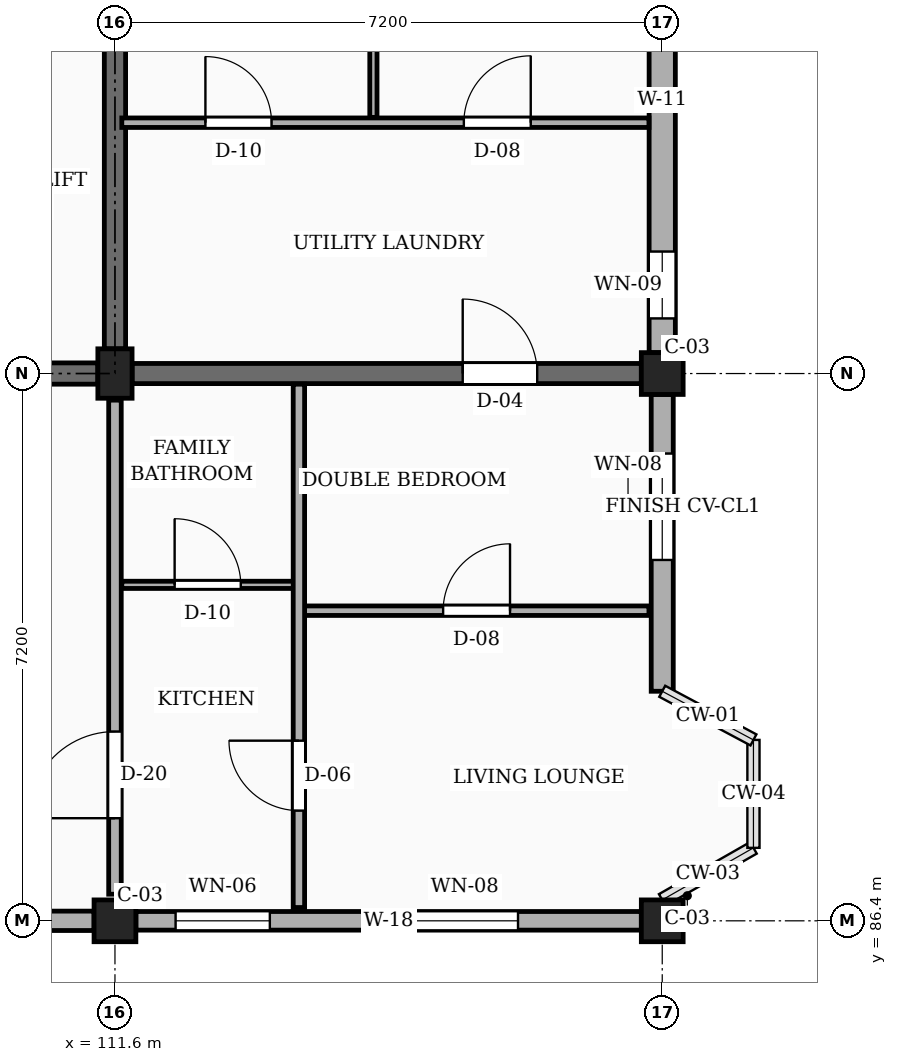
"""IFC4 building model, lengths in metres.
Left out: names, types, materials, properties, quantities, classifications, styles, units other than length and angle.
Written with IfcOpenShell. Run it as: python <this file> out.ifc"""

import sys

from ifc_helpers import new_model, si_unit, direction, frame, frame_2d, origin, origin_2d, place, context, subcontext, project, spatial, rectangle, extrude, element, fill, save


model = new_model("IFC4")
c1 = context("Model", 3, precision=1e-05, world=origin(), true_north=direction((0.0, 1.0)))
c2 = subcontext(c1, "Body", "Model", "MODEL_VIEW")
j1 = project(units=[si_unit("LENGTHUNIT", "METRE"), si_unit("PLANEANGLEUNIT", "RADIAN")], contexts=[c1])
p1 = place(None, origin())
s1 = spatial("IfcSite", under=j1, at=p1, CompositionType="ELEMENT")
p2 = place(p1, origin())
s2 = spatial("IfcBuilding", under=s1, at=p2, CompositionType="ELEMENT")
p3 = place(p2, frame((0.0, 0.0, 10.8)))
s3 = spatial("IfcBuildingStorey", under=s2, at=p3, CompositionType="ELEMENT", Elevation=10.8)
p4 = place(p3, frame((111.6, 86.4, 0.0), z_axis=(0.0, 0.0, 1.0), x_axis=(1.0, 0.0, 0.0)))
e1 = element("IfcColumn", 1, at=p4, inside=s3, PredefinedType="COLUMN", context=c2, shape_type="SweptSolid", body=[
    extrude(rectangle(XDim=0.55, YDim=0.55, at=origin_2d()), origin(), (0.0, 0.0, 1.0), 3.15),
])
p5 = place(p3, frame((111.6, 93.6, 0.0), z_axis=(0.0, 0.0, 1.0), x_axis=(1.0, 0.0, 0.0)))
e2 = element("IfcColumn", 2, at=p5, inside=s3, PredefinedType="COLUMN", context=c2, shape_type="SweptSolid", body=[
    extrude(rectangle(XDim=0.45, YDim=0.65, at=origin_2d()), origin(), (0.0, 0.0, 1.0), 3.15),
])
for number, where, z_axis, x_axis in (
    (3, (118.8, 86.4, 0.0), (0.0, 0.0, 1.0), (1.0, 0.0, 0.0)),
    (4, (118.8, 93.6, 0.0), (0.0, 0.0, 1.0), (1.0, 0.0, 0.0)),
):
    element("IfcColumn", number, at=place(p3, frame(where, z_axis=z_axis, x_axis=x_axis)), inside=s3, PredefinedType="COLUMN", context=c2, shape_type="SweptSolid", body=[
        extrude(rectangle(XDim=0.55, YDim=0.55, at=origin_2d()), origin(), (0.0, 0.0, 1.0), 3.15),
    ])
p6 = place(p3, frame((111.825, 93.6, 0.0), z_axis=(0.0, 0.0, 1.0), x_axis=(1.0, 0.0, 0.0)))
e5 = element("IfcWall", 5, at=p6, inside=s3, PredefinedType="SOLIDWALL", context=c2, shape_type="SweptSolid", body=[
    extrude(rectangle(XDim=6.7, YDim=0.265, at=frame_2d((3.35, 0.0))), origin(), (0.0, 0.0, 1.0), 2.19),
])
p7 = place(p6, frame((4.35, 0.0, 0.0)))
e6 = element("IfcOpeningElement", 6, at=p7, cuts=e5, PredefinedType="OPENING", context=c2, shape_type="SweptSolid", body=[
    extrude(rectangle(XDim=0.98, YDim=2.12, at=frame_2d((0.49, 1.06))), frame((0.0, 0.143, 0.0), z_axis=(0.0, -1.0, 0.0), x_axis=(1.0, 0.0, 0.0)), (0.0, 0.0, 1.0), 0.285),
])
p8 = place(p3, frame((104.675, 86.4, 0.0), z_axis=(0.0, 0.0, 1.0), x_axis=(1.0, 0.0, 0.0)))
e7 = element("IfcWall", 7, at=p8, inside=s3, PredefinedType="SOLIDWALL", context=c2, shape_type="SweptSolid", body=[
    extrude(rectangle(XDim=6.65, YDim=0.255, at=frame_2d((3.325, 0.0))), origin(), (0.0, 0.0, 1.0), 2.46),
])
p9 = place(p8, frame((0.45, 0.0, 0.78)))
e8 = element("IfcOpeningElement", 8, at=p9, cuts=e7, PredefinedType="OPENING", context=c2, shape_type="SweptSolid", body=[
    extrude(rectangle(XDim=1.08, YDim=1.15, at=frame_2d((0.54, 0.575))), frame((0.0, 0.137, 0.0), z_axis=(0.0, -1.0, 0.0), x_axis=(1.0, 0.0, 0.0)), (0.0, 0.0, 1.0), 0.275),
])
p10 = place(p8, frame((4.65, 0.0, 0.78)))
e9 = element("IfcOpeningElement", 9, at=p10, cuts=e7, PredefinedType="OPENING", context=c2, shape_type="SweptSolid", body=[
    extrude(rectangle(XDim=1.24, YDim=1.15, at=frame_2d((0.62, 0.575))), frame((0.0, 0.137, 0.0), z_axis=(0.0, -1.0, 0.0), x_axis=(1.0, 0.0, 0.0)), (0.0, 0.0, 1.0), 0.275),
])
p11 = place(p3, frame((111.875, 86.4, 0.0), z_axis=(0.0, 0.0, 1.0), x_axis=(1.0, 0.0, 0.0)))
e10 = element("IfcWall", 10, at=p11, inside=s3, PredefinedType="SOLIDWALL", context=c2, shape_type="SweptSolid", body=[
    extrude(rectangle(XDim=6.65, YDim=0.245, at=frame_2d((3.325, 0.0))), origin(), (0.0, 0.0, 1.0), 2.46),
])
p12 = place(p11, frame((0.522, 0.0, 0.78)))
e11 = element("IfcOpeningElement", 11, at=p12, cuts=e10, PredefinedType="OPENING", context=c2, shape_type="SweptSolid", body=[
    extrude(rectangle(XDim=1.24, YDim=1.15, at=frame_2d((0.62, 0.575))), frame((0.0, 0.133, 0.0), z_axis=(0.0, -1.0, 0.0), x_axis=(1.0, 0.0, 0.0)), (0.0, 0.0, 1.0), 0.265),
])
p13 = place(p11, frame((3.627, 0.0, 0.78)))
e12 = element("IfcOpeningElement", 12, at=p13, cuts=e10, PredefinedType="OPENING", context=c2, shape_type="SweptSolid", body=[
    extrude(rectangle(XDim=1.4, YDim=1.15, at=frame_2d((0.7, 0.575))), frame((0.0, 0.133, 0.0), z_axis=(0.0, -1.0, 0.0), x_axis=(1.0, 0.0, 0.0)), (0.0, 0.0, 1.0), 0.265),
])
p14 = place(p3, frame((118.8, 89.42, 0.0), z_axis=(0.0, 0.0, 1.0), x_axis=(0.0, 1.0, 0.0)))
e13 = element("IfcWall", 13, at=p14, inside=s3, PredefinedType="SOLIDWALL", context=c2, shape_type="SweptSolid", body=[
    extrude(rectangle(XDim=3.905, YDim=0.29, at=frame_2d((1.953, 0.0))), origin(), (0.0, 0.0, 1.0), 2.46),
])
p15 = place(p14, frame((1.728, 0.0, 0.78)))
e14 = element("IfcOpeningElement", 14, at=p15, cuts=e13, PredefinedType="OPENING", context=c2, shape_type="SweptSolid", body=[
    extrude(rectangle(XDim=1.4, YDim=1.15, at=frame_2d((0.7, 0.575))), frame((0.0, 0.155, 0.0), z_axis=(0.0, -1.0, 0.0), x_axis=(1.0, 0.0, 0.0)), (0.0, 0.0, 1.0), 0.31),
])
p16 = place(p3, frame((118.8, 93.875, 0.0), z_axis=(0.0, 0.0, 1.0), x_axis=(0.0, 1.0, 0.0)))
e15 = element("IfcWall", 15, at=p16, inside=s3, PredefinedType="SOLIDWALL", context=c2, shape_type="SweptSolid", body=[
    extrude(rectangle(XDim=6.65, YDim=0.345, at=frame_2d((3.325, 0.0))), origin(), (0.0, 0.0, 1.0), 2.46),
])
p17 = place(p16, frame((0.45, 0.0, 0.78)))
e16 = element("IfcOpeningElement", 16, at=p17, cuts=e15, PredefinedType="OPENING", context=c2, shape_type="SweptSolid", body=[
    extrude(rectangle(XDim=0.88, YDim=1.26, at=frame_2d((0.44, 0.63))), frame((0.0, 0.183, 0.0), z_axis=(0.0, -1.0, 0.0), x_axis=(1.0, 0.0, 0.0)), (0.0, 0.0, 1.0), 0.365),
])
p18 = place(p16, frame((4.65, 0.0, 0.78)))
e17 = element("IfcOpeningElement", 17, at=p18, cuts=e15, PredefinedType="OPENING", context=c2, shape_type="SweptSolid", body=[
    extrude(rectangle(XDim=1.04, YDim=1.26, at=frame_2d((0.52, 0.63))), frame((0.0, 0.183, 0.0), z_axis=(0.0, -1.0, 0.0), x_axis=(1.0, 0.0, 0.0)), (0.0, 0.0, 1.0), 0.365),
])
p19 = place(p3, frame((111.6, 93.925, 0.0), z_axis=(0.0, 0.0, 1.0), x_axis=(0.0, 1.0, 0.0)))
e18 = element("IfcWall", 18, at=p19, inside=s3, PredefinedType="SHEAR", context=c2, shape_type="SweptSolid", body=[
    extrude(rectangle(XDim=6.55, YDim=0.28, at=frame_2d((3.275, 0.0))), origin(), (0.0, 0.0, 1.0), 2.89),
])
p20 = place(p3, frame((104.625, 93.6, 0.0), z_axis=(0.0, 0.0, 1.0), x_axis=(1.0, 0.0, 0.0)))
e19 = element("IfcWall", 19, at=p20, inside=s3, PredefinedType="SHEAR", context=c2, shape_type="SweptSolid", body=[
    extrude(rectangle(XDim=6.75, YDim=0.28, at=frame_2d((3.375, 0.0))), origin(), (0.0, 0.0, 1.0), 2.89),
])
p21 = place(p20, frame((4.525, 0.0, 0.0)))
e20 = element("IfcOpeningElement", 20, at=p21, cuts=e19, PredefinedType="OPENING", context=c2, shape_type="SweptSolid", body=[
    extrude(rectangle(XDim=1.1, YDim=2.15, at=frame_2d((0.55, 1.075))), frame((0.0, 0.15, 0.0), z_axis=(0.0, -1.0, 0.0), x_axis=(1.0, 0.0, 0.0)), (0.0, 0.0, 1.0), 0.3),
])
p22 = place(p3, frame((111.6, 86.75, 0.0), z_axis=(0.0, 0.0, 1.0), x_axis=(0.0, 1.0, 0.0)))
e21 = element("IfcWall", 21, at=p22, inside=s3, PredefinedType="PARTITIONING", context=c2, shape_type="SweptSolid", body=[
    extrude(rectangle(XDim=6.5, YDim=0.165, at=frame_2d((3.25, 0.0))), origin(), (0.0, 0.0, 1.0), 2.24),
])
p23 = place(p22, frame((1.0, 0.0, 0.0)))
e22 = element("IfcOpeningElement", 22, at=p23, cuts=e21, PredefinedType="OPENING", context=c2, shape_type="SweptSolid", body=[
    extrude(rectangle(XDim=1.14, YDim=2.18, at=frame_2d((0.57, 1.09))), frame((0.0, 0.093, 0.0), z_axis=(0.0, -1.0, 0.0), x_axis=(1.0, 0.0, 0.0)), (0.0, 0.0, 1.0), 0.185),
])
p24 = place(p3, frame((114.09, 90.48, 0.0), z_axis=(0.0, 0.0, 1.0), x_axis=(1.0, 0.0, 0.0)))
e23 = element("IfcWall", 23, at=p24, inside=s3, PredefinedType="PARTITIONING", context=c2, shape_type="SweptSolid", body=[
    extrude(rectangle(XDim=4.535, YDim=0.125, at=frame_2d((2.268, 0.0))), origin(), (0.0, 0.0, 1.0), 2.325),
])
p25 = place(p24, frame((1.827, 0.0, 0.0)))
e24 = element("IfcOpeningElement", 24, at=p25, cuts=e23, PredefinedType="OPENING", context=c2, shape_type="SweptSolid", body=[
    extrude(rectangle(XDim=0.88, YDim=2.08, at=frame_2d((0.44, 1.04))), frame((0.0, 0.073, 0.0), z_axis=(0.0, -1.0, 0.0), x_axis=(1.0, 0.0, 0.0)), (0.0, 0.0, 1.0), 0.145),
])
p26 = place(p3, frame((111.69, 90.82, 0.0), z_axis=(0.0, 0.0, 1.0), x_axis=(1.0, 0.0, 0.0)))
e25 = element("IfcWall", 25, at=p26, inside=s3, PredefinedType="PARTITIONING", context=c2, shape_type="SweptSolid", body=[
    extrude(rectangle(XDim=2.26, YDim=0.095, at=frame_2d((1.13, 0.0))), origin(), (0.0, 0.0, 1.0), 2.325),
])
p27 = place(p26, frame((0.695, 0.0, 0.0)))
e26 = element("IfcOpeningElement", 26, at=p27, cuts=e25, PredefinedType="OPENING", context=c2, shape_type="SweptSolid", body=[
    extrude(rectangle(XDim=0.87, YDim=2.05, at=frame_2d((0.435, 1.025))), frame((0.0, 0.058, 0.0), z_axis=(0.0, -1.0, 0.0), x_axis=(1.0, 0.0, 0.0)), (0.0, 0.0, 1.0), 0.115),
])
p28 = place(p3, frame((114.02, 86.575, 0.0), z_axis=(0.0, 0.0, 1.0), x_axis=(0.0, 1.0, 0.0)))
e27 = element("IfcWall", 27, at=p28, inside=s3, PredefinedType="PARTITIONING", context=c2, shape_type="SweptSolid", body=[
    extrude(rectangle(XDim=6.885, YDim=0.15, at=frame_2d((3.442, 0.0))), origin(), (0.0, 0.0, 1.0), 2.325),
])
p29 = place(p28, frame((1.275, 0.0, 0.0)))
e28 = element("IfcOpeningElement", 28, at=p29, cuts=e27, PredefinedType="OPENING", context=c2, shape_type="SweptSolid", body=[
    extrude(rectangle(XDim=0.92, YDim=2.1, at=frame_2d((0.46, 1.05))), frame((0.0, 0.085, 0.0), z_axis=(0.0, -1.0, 0.0), x_axis=(1.0, 0.0, 0.0)), (0.0, 0.0, 1.0), 0.17),
])
p30 = place(p3, frame((111.69, 96.9, 0.0), z_axis=(0.0, 0.0, 1.0), x_axis=(1.0, 0.0, 0.0)))
e29 = element("IfcWall", 29, at=p30, inside=s3, PredefinedType="PARTITIONING", context=c2, shape_type="SweptSolid", body=[
    extrude(rectangle(XDim=6.935, YDim=0.125, at=frame_2d((3.468, 0.0))), origin(), (0.0, 0.0, 1.0), 2.325),
])
p31 = place(p30, frame((1.1, 0.0, 0.0)))
e30 = element("IfcOpeningElement", 30, at=p31, cuts=e29, PredefinedType="OPENING", context=c2, shape_type="SweptSolid", body=[
    extrude(rectangle(XDim=0.87, YDim=2.05, at=frame_2d((0.435, 1.025))), frame((0.0, 0.073, 0.0), z_axis=(0.0, -1.0, 0.0), x_axis=(1.0, 0.0, 0.0)), (0.0, 0.0, 1.0), 0.145),
])
p32 = place(p30, frame((4.5, 0.0, 0.0)))
e31 = element("IfcOpeningElement", 31, at=p32, cuts=e29, PredefinedType="OPENING", context=c2, shape_type="SweptSolid", body=[
    extrude(rectangle(XDim=0.88, YDim=2.08, at=frame_2d((0.44, 1.04))), frame((0.0, 0.073, 0.0), z_axis=(0.0, -1.0, 0.0), x_axis=(1.0, 0.0, 0.0)), (0.0, 0.0, 1.0), 0.145),
])
p33 = place(p3, frame((115.0, 96.97, 0.0), z_axis=(0.0, 0.0, 1.0), x_axis=(0.0, 1.0, 0.0)))
e32 = element("IfcWall", 32, at=p33, inside=s3, PredefinedType="PARTITIONING", context=c2, shape_type="SweptSolid", body=[
    extrude(rectangle(XDim=3.69, YDim=0.095, at=frame_2d((1.845, 0.0))), origin(), (0.0, 0.0, 1.0), 2.325),
])
p34 = place(p12, origin())
e33 = element("IfcWindow", 33, at=p34, inside=s3, PartitioningType="SINGLE_PANEL", PredefinedType="WINDOW", context=c2, shape_type="SweptSolid", body=[
    extrude(rectangle(XDim=1.24, YDim=1.15, at=frame_2d((0.62, 0.575))), frame((0.0, 0.03, 0.0), z_axis=(0.0, -1.0, 0.0), x_axis=(1.0, 0.0, 0.0)), (0.0, 0.0, 1.0), 0.06),
])
fill(e11, e33)
p35 = place(p13, origin())
e34 = element("IfcWindow", 34, at=p35, inside=s3, PartitioningType="SINGLE_PANEL", PredefinedType="WINDOW", context=c2, shape_type="SweptSolid", body=[
    extrude(rectangle(XDim=1.4, YDim=1.15, at=frame_2d((0.7, 0.575))), frame((0.0, 0.03, 0.0), z_axis=(0.0, -1.0, 0.0), x_axis=(1.0, 0.0, 0.0)), (0.0, 0.0, 1.0), 0.06),
])
fill(e12, e34)
p36 = place(p15, origin())
e35 = element("IfcWindow", 35, at=p36, inside=s3, PartitioningType="SINGLE_PANEL", PredefinedType="WINDOW", context=c2, shape_type="SweptSolid", body=[
    extrude(rectangle(XDim=1.4, YDim=1.15, at=frame_2d((0.7, 0.575))), frame((0.0, 0.03, 0.0), z_axis=(0.0, -1.0, 0.0), x_axis=(1.0, 0.0, 0.0)), (0.0, 0.0, 1.0), 0.06),
])
fill(e14, e35)
p37 = place(p17, origin())
e36 = element("IfcWindow", 36, at=p37, inside=s3, PartitioningType="SINGLE_PANEL", PredefinedType="WINDOW", context=c2, shape_type="SweptSolid", body=[
    extrude(rectangle(XDim=0.88, YDim=1.26, at=frame_2d((0.44, 0.63))), frame((0.0, 0.03, 0.0), z_axis=(0.0, -1.0, 0.0), x_axis=(1.0, 0.0, 0.0)), (0.0, 0.0, 1.0), 0.06),
])
fill(e16, e36)
p38 = place(p23, origin())
e37 = element("IfcDoor", 37, at=p38, inside=s3, OperationType="SINGLE_SWING_LEFT", PredefinedType="DOOR", context=c2, shape_type="SweptSolid", body=[
    extrude(rectangle(XDim=1.14, YDim=2.18, at=frame_2d((0.57, 1.09))), frame((0.0, 0.025, 0.0), z_axis=(0.0, -1.0, 0.0), x_axis=(1.0, 0.0, 0.0)), (0.0, 0.0, 1.0), 0.05),
])
fill(e22, e37)
p39 = place(p25, origin())
e38 = element("IfcDoor", 38, at=p39, inside=s3, OperationType="SINGLE_SWING_RIGHT", PredefinedType="DOOR", context=c2, shape_type="SweptSolid", body=[
    extrude(rectangle(XDim=0.88, YDim=2.08, at=frame_2d((0.44, 1.04))), frame((0.0, 0.025, 0.0), z_axis=(0.0, -1.0, 0.0), x_axis=(1.0, 0.0, 0.0)), (0.0, 0.0, 1.0), 0.05),
])
fill(e24, e38)
p40 = place(p27, origin())
e39 = element("IfcDoor", 39, at=p40, inside=s3, OperationType="SINGLE_SWING_LEFT", PredefinedType="DOOR", context=c2, shape_type="SweptSolid", body=[
    extrude(rectangle(XDim=0.87, YDim=2.05, at=frame_2d((0.435, 1.025))), frame((0.0, 0.025, 0.0), z_axis=(0.0, -1.0, 0.0), x_axis=(1.0, 0.0, 0.0)), (0.0, 0.0, 1.0), 0.05),
])
fill(e26, e39)
p41 = place(p29, origin())
e40 = element("IfcDoor", 40, at=p41, inside=s3, OperationType="SINGLE_SWING_RIGHT", PredefinedType="DOOR", context=c2, shape_type="SweptSolid", body=[
    extrude(rectangle(XDim=0.92, YDim=2.1, at=frame_2d((0.46, 1.05))), frame((0.0, 0.025, 0.0), z_axis=(0.0, -1.0, 0.0), x_axis=(1.0, 0.0, 0.0)), (0.0, 0.0, 1.0), 0.05),
])
fill(e28, e40)
p42 = place(p31, origin())
e41 = element("IfcDoor", 41, at=p42, inside=s3, OperationType="SINGLE_SWING_LEFT", PredefinedType="DOOR", context=c2, shape_type="SweptSolid", body=[
    extrude(rectangle(XDim=0.87, YDim=2.05, at=frame_2d((0.435, 1.025))), frame((0.0, 0.025, 0.0), z_axis=(0.0, -1.0, 0.0), x_axis=(1.0, 0.0, 0.0)), (0.0, 0.0, 1.0), 0.05),
])
fill(e30, e41)
p43 = place(p32, origin())
e42 = element("IfcDoor", 42, at=p43, inside=s3, OperationType="SINGLE_SWING_RIGHT", PredefinedType="DOOR", context=c2, shape_type="SweptSolid", body=[
    extrude(rectangle(XDim=0.88, YDim=2.08, at=frame_2d((0.44, 1.04))), frame((0.0, 0.025, 0.0), z_axis=(0.0, -1.0, 0.0), x_axis=(1.0, 0.0, 0.0)), (0.0, 0.0, 1.0), 0.05),
])
fill(e31, e42)
p44 = place(p7, origin())
e43 = element("IfcDoor", 43, at=p44, inside=s3, OperationType="SINGLE_SWING_LEFT", PredefinedType="DOOR", context=c2, shape_type="SweptSolid", body=[
    extrude(rectangle(XDim=0.98, YDim=2.12, at=frame_2d((0.49, 1.06))), frame((0.0, 0.025, 0.0), z_axis=(0.0, -1.0, 0.0), x_axis=(1.0, 0.0, 0.0)), (0.0, 0.0, 1.0), 0.05),
])
fill(e6, e43)
save(model, sys.argv[1])
